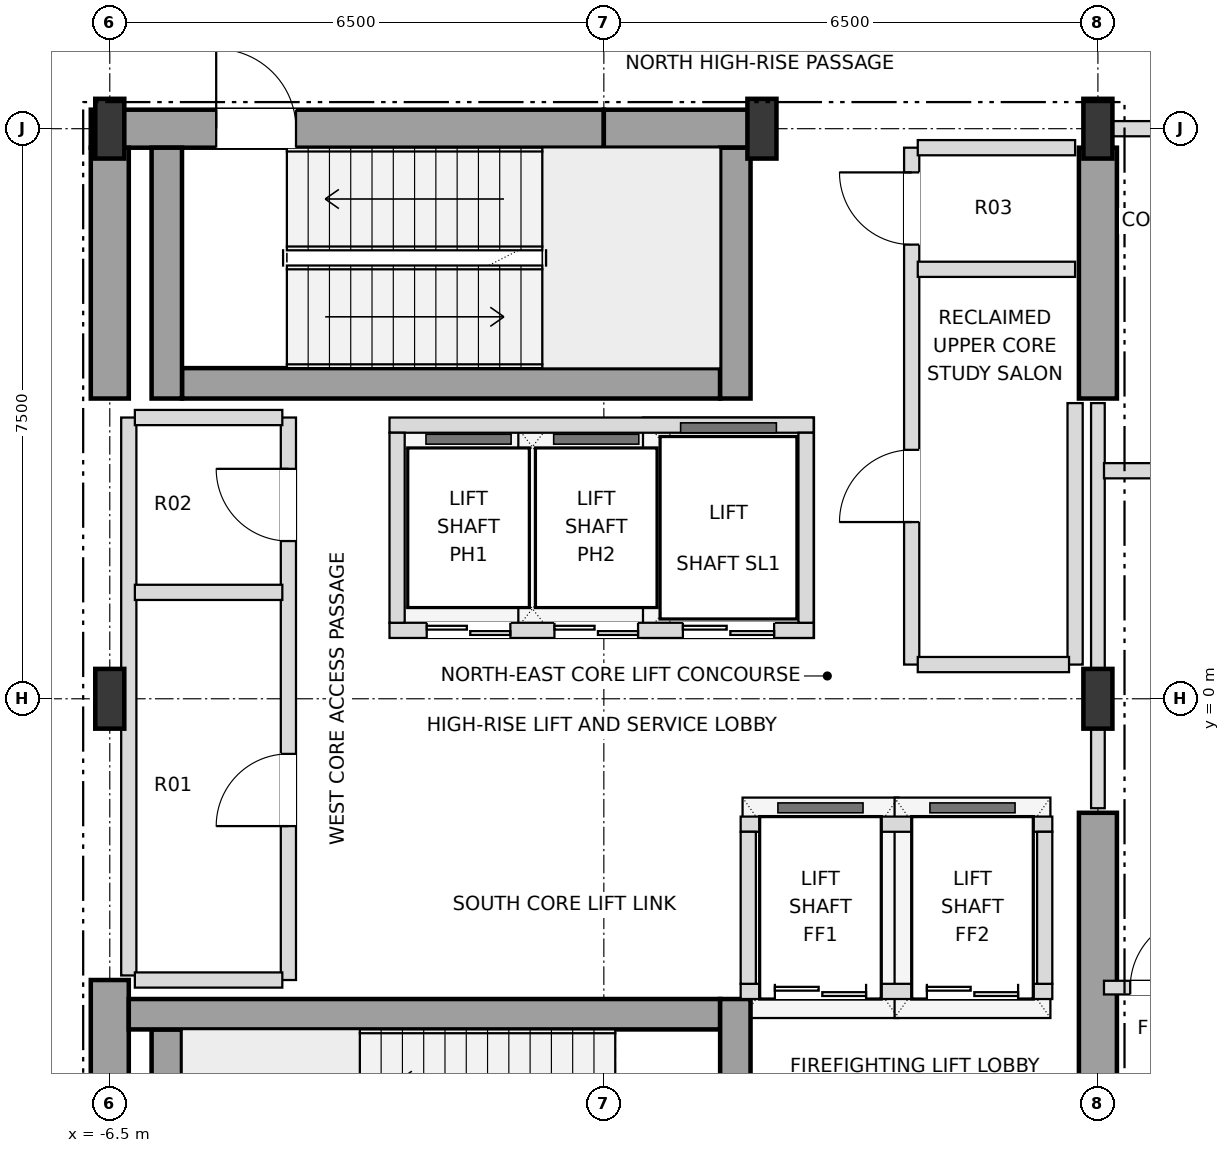
"""IFC4 building model, lengths in metres.
Left out: names, types, materials, properties, quantities, classifications, styles, units other than length and angle.
Written with IfcOpenShell. Run it as: python <this file> out.ifc"""

import sys

from ifc_helpers import new_model, si_unit, direction, frame, frame_2d, origin, origin_2d, place, context, subcontext, project, spatial, rectangle, i_section, extrude, element, fill, save


model = new_model("IFC4")
c1 = context("Model", 3, precision=1e-05, world=origin(), true_north=direction((0.0, 1.0)))
c2 = subcontext(c1, "Body", "Model", "MODEL_VIEW")
j1 = project(units=[si_unit("LENGTHUNIT", "METRE"), si_unit("PLANEANGLEUNIT", "RADIAN")], contexts=[c1])
p1 = place(None, origin())
s1 = spatial("IfcSite", under=j1, at=p1, CompositionType="ELEMENT")
p2 = place(p1, origin())
s2 = spatial("IfcBuilding", under=s1, at=p2, CompositionType="ELEMENT")
p3 = place(p2, frame((0.0, 0.0, 217.8)))
s3 = spatial("IfcBuildingStorey", under=s2, at=p3, CompositionType="ELEMENT", Elevation=217.8)
for number, where, z_axis, x_axis in (
    (1, (-6.5, 0.0, 0.0), (0.0, 0.0, 1.0), (1.0, 0.0, 0.0)),
    (2, (6.5, 0.0, 0.0), (0.0, 0.0, 1.0), (1.0, 0.0, 0.0)),
    (3, (-6.5, 7.5, 0.0), (0.0, 0.0, 1.0), (1.0, 0.0, 0.0)),
    (4, (2.08, 7.5, 0.0), (0.0, 0.0, 1.0), (1.0, 0.0, 0.0)),
    (5, (6.5, 7.5, 0.0), (0.0, 0.0, 1.0), (1.0, 0.0, 0.0)),
):
    element("IfcColumn", number, at=place(p3, frame(where, z_axis=z_axis, x_axis=x_axis)), inside=s3, PredefinedType="COLUMN", context=c2, shape_type="SweptSolid", body=[
        extrude(i_section(OverallWidth=0.382, OverallDepth=0.786, WebThickness=0.02, FlangeThickness=0.033, at=origin_2d()), origin(), (0.0, 0.0, 1.0), 4.5),
    ])
p4 = place(p3, frame((-6.75, 7.5, 0.0), z_axis=(0.0, 0.0, 1.0), x_axis=(1.0, 0.0, 0.0)))
e6 = element("IfcWall", 6, at=p4, inside=s3, PredefinedType="SHEAR", context=c2, shape_type="SweptSolid", body=[
    extrude(rectangle(XDim=6.75, YDim=0.5, at=frame_2d((3.375, 0.0))), origin(), (0.0, 0.0, 1.0), 4.28),
])
p5 = place(p4, frame((1.65, 0.0, 0.0)))
e7 = element("IfcOpeningElement", 7, at=p5, cuts=e6, PredefinedType="OPENING", context=c2, shape_type="SweptSolid", body=[
    extrude(rectangle(XDim=1.05, YDim=2.15, at=frame_2d((0.525, 1.075))), frame((0.0, 0.26, 0.0), z_axis=(0.0, -1.0, 0.0), x_axis=(1.0, 0.0, 0.0)), (0.0, 0.0, 1.0), 0.52),
])
p6 = place(p3, frame((0.0, 7.5, 0.0), z_axis=(0.0, 0.0, 1.0), x_axis=(1.0, 0.0, 0.0)))
e8 = element("IfcWall", 8, at=p6, inside=s3, PredefinedType="SHEAR", context=c2, shape_type="SweptSolid", body=[
    extrude(rectangle(XDim=2.08, YDim=0.5, at=frame_2d((1.04, 0.0))), origin(), (0.0, 0.0, 1.0), 4.28),
])
p7 = place(p3, frame((-6.5, -7.25, 0.0), z_axis=(0.0, 0.0, 1.0), x_axis=(0.0, 1.0, 0.0)))
e9 = element("IfcWall", 9, at=p7, inside=s3, PredefinedType="SHEAR", context=c2, shape_type="SweptSolid", body=[
    extrude(rectangle(XDim=3.55, YDim=0.5, at=frame_2d((1.775, 0.0))), origin(), (0.0, 0.0, 1.0), 4.28),
])
p8 = place(p3, frame((-6.5, 3.95, 0.0), z_axis=(0.0, 0.0, 1.0), x_axis=(0.0, 1.0, 0.0)))
e10 = element("IfcWall", 10, at=p8, inside=s3, PredefinedType="SHEAR", context=c2, shape_type="SweptSolid", body=[
    extrude(rectangle(XDim=3.3, YDim=0.5, at=frame_2d((1.65, 0.0))), origin(), (0.0, 0.0, 1.0), 4.28),
])
p9 = place(p3, frame((6.5, -7.25, 0.0), z_axis=(0.0, 0.0, 1.0), x_axis=(0.0, 1.0, 0.0)))
e11 = element("IfcWall", 11, at=p9, inside=s3, PredefinedType="SHEAR", context=c2, shape_type="SweptSolid", body=[
    extrude(rectangle(XDim=5.75, YDim=0.5, at=frame_2d((2.875, 0.0))), origin(), (0.0, 0.0, 1.0), 4.28),
])
p10 = place(p9, frame((0.85, 0.0, 0.0)))
e12 = element("IfcOpeningElement", 12, at=p10, cuts=e11, PredefinedType="OPENING", context=c2, shape_type="SweptSolid", body=[
    extrude(rectangle(XDim=1.05, YDim=2.15, at=frame_2d((0.525, 1.075))), frame((0.0, 0.26, 0.0), z_axis=(0.0, -1.0, 0.0), x_axis=(1.0, 0.0, 0.0)), (0.0, 0.0, 1.0), 0.52),
])
p11 = place(p3, frame((6.5, 3.95, 0.0), z_axis=(0.0, 0.0, 1.0), x_axis=(0.0, 1.0, 0.0)))
e13 = element("IfcWall", 13, at=p11, inside=s3, PredefinedType="SHEAR", context=c2, shape_type="SweptSolid", body=[
    extrude(rectangle(XDim=3.3, YDim=0.5, at=frame_2d((1.65, 0.0))), origin(), (0.0, 0.0, 1.0), 4.28),
])
p12 = place(p3, frame((-5.75, -7.25, 0.0), z_axis=(0.0, 0.0, 1.0), x_axis=(0.0, 1.0, 0.0)))
e14 = element("IfcWall", 14, at=p12, inside=s3, PredefinedType="SHEAR", context=c2, shape_type="SweptSolid", body=[
    extrude(rectangle(XDim=2.9, YDim=0.4, at=frame_2d((1.45, 0.0))), origin(), (0.0, 0.0, 1.0), 4.28),
])
p13 = place(p3, frame((-6.25, -4.15, 0.0), z_axis=(0.0, 0.0, 1.0), x_axis=(1.0, 0.0, 0.0)))
e15 = element("IfcWall", 15, at=p13, inside=s3, PredefinedType="SHEAR", context=c2, shape_type="SweptSolid", body=[
    extrude(rectangle(XDim=7.78, YDim=0.4, at=frame_2d((3.89, 0.0))), origin(), (0.0, 0.0, 1.0), 4.28),
])
p14 = place(p3, frame((1.73, -7.25, 0.0), z_axis=(0.0, 0.0, 1.0), x_axis=(0.0, 1.0, 0.0)))
e16 = element("IfcWall", 16, at=p14, inside=s3, PredefinedType="SHEAR", context=c2, shape_type="SweptSolid", body=[
    extrude(rectangle(XDim=3.3, YDim=0.4, at=frame_2d((1.65, 0.0))), origin(), (0.0, 0.0, 1.0), 4.28),
])
p15 = place(p14, frame((0.9, 0.0, 0.0)))
e17 = element("IfcOpeningElement", 17, at=p15, cuts=e16, PredefinedType="OPENING", context=c2, shape_type="SweptSolid", body=[
    extrude(rectangle(XDim=1.05, YDim=2.15, at=frame_2d((0.525, 1.075))), frame((0.0, 0.21, 0.0), z_axis=(0.0, -1.0, 0.0), x_axis=(1.0, 0.0, 0.0)), (0.0, 0.0, 1.0), 0.42),
])
p16 = place(p3, frame((-5.55, 4.15, 0.0), z_axis=(0.0, 0.0, 1.0), x_axis=(1.0, 0.0, 0.0)))
e18 = element("IfcWall", 18, at=p16, inside=s3, PredefinedType="SHEAR", context=c2, shape_type="SweptSolid", body=[
    extrude(rectangle(XDim=7.08, YDim=0.4, at=frame_2d((3.54, 0.0))), origin(), (0.0, 0.0, 1.0), 4.28),
])
for number, where, z_axis, x_axis in (
    (19, (1.73, 3.95, 0.0), (0.0, 0.0, 1.0), (0.0, 1.0, 0.0)),
    (20, (-5.75, 3.95, 0.0), (0.0, 0.0, 1.0), (0.0, 1.0, 0.0)),
):
    element("IfcWall", number, at=place(p3, frame(where, z_axis=z_axis, x_axis=x_axis)), inside=s3, PredefinedType="SHEAR", context=c2, shape_type="SweptSolid", body=[
        extrude(rectangle(XDim=3.3, YDim=0.4, at=frame_2d((1.65, 0.0))), origin(), (0.0, 0.0, 1.0), 4.28),
    ])
p17 = place(p3, frame((-2.82, 0.9, 0.0), z_axis=(0.0, 0.0, 1.0), x_axis=(1.0, 0.0, 0.0)))
e21 = element("IfcWall", 21, at=p17, inside=s3, PredefinedType="SOLIDWALL", context=c2, shape_type="SweptSolid", body=[
    extrude(rectangle(XDim=5.58, YDim=0.2, at=frame_2d((2.79, 0.0))), origin(), (0.0, 0.0, 1.0), 4.28),
])
p18 = place(p17, frame((0.49, 0.0, 0.0)))
e22 = element("IfcOpeningElement", 22, at=p18, cuts=e21, PredefinedType="OPENING", context=c2, shape_type="SweptSolid", body=[
    extrude(rectangle(XDim=1.1, YDim=2.15, at=frame_2d((0.55, 1.075))), frame((0.0, 0.11, 0.0), z_axis=(0.0, -1.0, 0.0), x_axis=(1.0, 0.0, 0.0)), (0.0, 0.0, 1.0), 0.22),
])
p19 = place(p17, frame((2.17, 0.0, 0.0)))
e23 = element("IfcOpeningElement", 23, at=p19, cuts=e21, PredefinedType="OPENING", context=c2, shape_type="SweptSolid", body=[
    extrude(rectangle(XDim=1.1, YDim=2.15, at=frame_2d((0.55, 1.075))), frame((0.0, 0.11, 0.0), z_axis=(0.0, -1.0, 0.0), x_axis=(1.0, 0.0, 0.0)), (0.0, 0.0, 1.0), 0.22),
])
p20 = place(p17, frame((3.86, 0.0, 0.0)))
e24 = element("IfcOpeningElement", 24, at=p20, cuts=e21, PredefinedType="OPENING", context=c2, shape_type="SweptSolid", body=[
    extrude(rectangle(XDim=1.2, YDim=2.2, at=frame_2d((0.6, 1.1))), frame((0.0, 0.11, 0.0), z_axis=(0.0, -1.0, 0.0), x_axis=(1.0, 0.0, 0.0)), (0.0, 0.0, 1.0), 0.22),
])
p21 = place(p3, frame((-2.82, 3.6, 0.0), z_axis=(0.0, 0.0, 1.0), x_axis=(1.0, 0.0, 0.0)))
e25 = element("IfcWall", 25, at=p21, inside=s3, PredefinedType="SOLIDWALL", context=c2, shape_type="SweptSolid", body=[
    extrude(rectangle(XDim=5.58, YDim=0.2, at=frame_2d((2.79, 0.0))), origin(), (0.0, 0.0, 1.0), 4.28),
])
for number, where, z_axis, x_axis in (
    (26, (-2.72, 1.0, 0.0), (0.0, 0.0, 1.0), (0.0, 1.0, 0.0)),
    (27, (2.66, 1.0, 0.0), (0.0, 0.0, 1.0), (0.0, 1.0, 0.0)),
):
    element("IfcWall", number, at=place(p3, frame(where, z_axis=z_axis, x_axis=x_axis)), inside=s3, PredefinedType="SOLIDWALL", context=c2, shape_type="SweptSolid", body=[
        extrude(rectangle(XDim=2.5, YDim=0.2, at=frame_2d((1.25, 0.0))), origin(), (0.0, 0.0, 1.0), 4.28),
    ])
p22 = place(p3, frame((1.8, -3.85, 0.0), z_axis=(0.0, 0.0, 1.0), x_axis=(1.0, 0.0, 0.0)))
e28 = element("IfcWall", 28, at=p22, inside=s3, PredefinedType="SOLIDWALL", context=c2, shape_type="SweptSolid", body=[
    extrude(rectangle(XDim=4.1, YDim=0.2, at=frame_2d((2.05, 0.0))), origin(), (0.0, 0.0, 1.0), 4.28),
])
p23 = place(p22, frame((0.45, 0.0, 0.0)))
e29 = element("IfcOpeningElement", 29, at=p23, cuts=e28, PredefinedType="OPENING", context=c2, shape_type="SweptSolid", body=[
    extrude(rectangle(XDim=1.2, YDim=2.2, at=frame_2d((0.6, 1.1))), frame((0.0, 0.11, 0.0), z_axis=(0.0, -1.0, 0.0), x_axis=(1.0, 0.0, 0.0)), (0.0, 0.0, 1.0), 0.22),
])
p24 = place(p22, frame((2.45, 0.0, 0.0)))
e30 = element("IfcOpeningElement", 30, at=p24, cuts=e28, PredefinedType="OPENING", context=c2, shape_type="SweptSolid", body=[
    extrude(rectangle(XDim=1.2, YDim=2.2, at=frame_2d((0.6, 1.1))), frame((0.0, 0.11, 0.0), z_axis=(0.0, -1.0, 0.0), x_axis=(1.0, 0.0, 0.0)), (0.0, 0.0, 1.0), 0.22),
])
p25 = place(p3, frame((1.8, -1.65, 0.0), z_axis=(0.0, 0.0, 1.0), x_axis=(1.0, 0.0, 0.0)))
e31 = element("IfcWall", 31, at=p25, inside=s3, PredefinedType="SOLIDWALL", context=c2, shape_type="SweptSolid", body=[
    extrude(rectangle(XDim=4.1, YDim=0.2, at=frame_2d((2.05, 0.0))), origin(), (0.0, 0.0, 1.0), 4.28),
])
for number, where, z_axis, x_axis in (
    (32, (1.9, -3.75, 0.0), (0.0, 0.0, 1.0), (0.0, 1.0, 0.0)),
    (33, (5.8, -3.75, 0.0), (0.0, 0.0, 1.0), (0.0, 1.0, 0.0)),
):
    element("IfcWall", number, at=place(p3, frame(where, z_axis=z_axis, x_axis=x_axis)), inside=s3, PredefinedType="SOLIDWALL", context=c2, shape_type="SweptSolid", body=[
        extrude(rectangle(XDim=2.0, YDim=0.2, at=frame_2d((1.0, 0.0))), origin(), (0.0, 0.0, 1.0), 4.28),
    ])
p26 = place(p3, frame((-6.25, -3.64, 0.0), z_axis=(0.0, 0.0, 1.0), x_axis=(0.0, 1.0, 0.0)))
e34 = element("IfcWall", 34, at=p26, inside=s3, PredefinedType="SOLIDWALL", context=c2, shape_type="SweptSolid", body=[
    extrude(rectangle(XDim=7.34, YDim=0.2, at=frame_2d((3.67, 0.0))), origin(), (0.0, 0.0, 1.0), 4.28),
])
p27 = place(p3, frame((-4.15, -3.7, 0.0), z_axis=(0.0, 0.0, 1.0), x_axis=(0.0, 1.0, 0.0)))
e35 = element("IfcWall", 35, at=p27, inside=s3, PredefinedType="SOLIDWALL", context=c2, shape_type="SweptSolid", body=[
    extrude(rectangle(XDim=7.4, YDim=0.2, at=frame_2d((3.7, 0.0))), origin(), (0.0, 0.0, 1.0), 4.28),
])
p28 = place(p27, frame((2.025, 0.0, 0.0)))
e36 = element("IfcOpeningElement", 36, at=p28, cuts=e35, PredefinedType="OPENING", context=c2, shape_type="SweptSolid", body=[
    extrude(rectangle(XDim=0.95, YDim=2.15, at=frame_2d((0.475, 1.075))), frame((0.0, 0.11, 0.0), z_axis=(0.0, -1.0, 0.0), x_axis=(1.0, 0.0, 0.0)), (0.0, 0.0, 1.0), 0.22),
])
p29 = place(p27, frame((5.775, 0.0, 0.0)))
e37 = element("IfcOpeningElement", 37, at=p29, cuts=e35, PredefinedType="OPENING", context=c2, shape_type="SweptSolid", body=[
    extrude(rectangle(XDim=0.95, YDim=2.15, at=frame_2d((0.475, 1.075))), frame((0.0, 0.11, 0.0), z_axis=(0.0, -1.0, 0.0), x_axis=(1.0, 0.0, 0.0)), (0.0, 0.0, 1.0), 0.22),
])
p30 = place(p3, frame((4.05, 0.45, 0.0), z_axis=(0.0, 0.0, 1.0), x_axis=(0.0, 1.0, 0.0)))
e38 = element("IfcWall", 38, at=p30, inside=s3, PredefinedType="SOLIDWALL", context=c2, shape_type="SweptSolid", body=[
    extrude(rectangle(XDim=6.8, YDim=0.2, at=frame_2d((3.4, 0.0))), origin(), (0.0, 0.0, 1.0), 4.28),
])
p31 = place(p30, frame((1.875, 0.0, 0.0)))
e39 = element("IfcOpeningElement", 39, at=p31, cuts=e38, PredefinedType="OPENING", context=c2, shape_type="SweptSolid", body=[
    extrude(rectangle(XDim=0.95, YDim=2.15, at=frame_2d((0.475, 1.075))), frame((0.0, 0.11, 0.0), z_axis=(0.0, -1.0, 0.0), x_axis=(1.0, 0.0, 0.0)), (0.0, 0.0, 1.0), 0.22),
])
p32 = place(p30, frame((5.525, 0.0, 0.0)))
e40 = element("IfcOpeningElement", 40, at=p32, cuts=e38, PredefinedType="OPENING", context=c2, shape_type="SweptSolid", body=[
    extrude(rectangle(XDim=0.95, YDim=2.15, at=frame_2d((0.475, 1.075))), frame((0.0, 0.11, 0.0), z_axis=(0.0, -1.0, 0.0), x_axis=(1.0, 0.0, 0.0)), (0.0, 0.0, 1.0), 0.22),
])
p33 = place(p3, frame((6.2, 0.45, 0.0), z_axis=(0.0, 0.0, 1.0), x_axis=(0.0, 1.0, 0.0)))
e41 = element("IfcWall", 41, at=p33, inside=s3, PredefinedType="SOLIDWALL", context=c2, shape_type="SweptSolid", body=[
    extrude(rectangle(XDim=3.44, YDim=0.2, at=frame_2d((1.72, 0.0))), origin(), (0.0, 0.0, 1.0), 4.28),
])
p34 = place(p3, frame((6.5, -1.44, 0.0), z_axis=(0.0, 0.0, 1.0), x_axis=(0.0, 1.0, 0.0)))
e42 = element("IfcWall", 42, at=p34, inside=s3, PredefinedType="PARTITIONING", context=c2, shape_type="SweptSolid", body=[
    extrude(rectangle(XDim=5.33, YDim=0.18, at=frame_2d((2.665, 0.0))), origin(), (0.0, 0.0, 1.0), 3.726),
])
p35 = place(p3, frame((6.58, -3.8, 0.0), z_axis=(0.0, 0.0, 1.0), x_axis=(1.0, 0.0, 0.0)))
e43 = element("IfcWall", 43, at=p35, inside=s3, PredefinedType="PARTITIONING", context=c2, shape_type="SweptSolid", body=[
    extrude(rectangle(XDim=1.64, YDim=0.18, at=frame_2d((0.82, 0.0))), origin(), (0.0, 0.0, 1.0), 4.28),
])
p36 = place(p35, frame((0.345, 0.0, 0.0)))
e44 = element("IfcOpeningElement", 44, at=p36, cuts=e43, PredefinedType="OPENING", context=c2, shape_type="SweptSolid", body=[
    extrude(rectangle(XDim=0.95, YDim=2.15, at=frame_2d((0.475, 1.075))), frame((0.0, 0.1, 0.0), z_axis=(0.0, -1.0, 0.0), x_axis=(1.0, 0.0, 0.0)), (0.0, 0.0, 1.0), 0.2),
])
p37 = place(p3, frame((-6.17, -3.7, 0.0), z_axis=(0.0, 0.0, 1.0), x_axis=(1.0, 0.0, 0.0)))
e45 = element("IfcWall", 45, at=p37, inside=s3, PredefinedType="SOLIDWALL", context=c2, shape_type="SweptSolid", body=[
    extrude(rectangle(XDim=1.94, YDim=0.2, at=frame_2d((0.97, 0.0))), origin(), (0.0, 0.0, 1.0), 4.28),
])
p38 = place(p3, frame((4.13, 0.45, 0.0), z_axis=(0.0, 0.0, 1.0), x_axis=(1.0, 0.0, 0.0)))
e46 = element("IfcWall", 46, at=p38, inside=s3, PredefinedType="SOLIDWALL", context=c2, shape_type="SweptSolid", body=[
    extrude(rectangle(XDim=1.99, YDim=0.2, at=frame_2d((0.995, 0.0))), origin(), (0.0, 0.0, 1.0), 4.28),
])
p39 = place(p3, frame((-6.17, 1.4, 0.0), z_axis=(0.0, 0.0, 1.0), x_axis=(1.0, 0.0, 0.0)))
e47 = element("IfcWall", 47, at=p39, inside=s3, PredefinedType="SOLIDWALL", context=c2, shape_type="SweptSolid", body=[
    extrude(rectangle(XDim=1.94, YDim=0.2, at=frame_2d((0.97, 0.0))), origin(), (0.0, 0.0, 1.0), 4.28),
])
p40 = place(p3, frame((6.58, 3.0, 0.0), z_axis=(0.0, 0.0, 1.0), x_axis=(1.0, 0.0, 0.0)))
e48 = element("IfcWall", 48, at=p40, inside=s3, PredefinedType="SOLIDWALL", context=c2, shape_type="SweptSolid", body=[
    extrude(rectangle(XDim=4.74, YDim=0.2, at=frame_2d((2.37, 0.0))), origin(), (0.0, 0.0, 1.0), 4.28),
])
p41 = place(p40, frame((1.845, 0.0, 0.0)))
e49 = element("IfcOpeningElement", 49, at=p41, cuts=e48, PredefinedType="OPENING", context=c2, shape_type="SweptSolid", body=[
    extrude(rectangle(XDim=0.95, YDim=2.15, at=frame_2d((0.475, 1.075))), frame((0.0, 0.11, 0.0), z_axis=(0.0, -1.0, 0.0), x_axis=(1.0, 0.0, 0.0)), (0.0, 0.0, 1.0), 0.22),
])
p42 = place(p3, frame((-6.17, 3.7, 0.0), z_axis=(0.0, 0.0, 1.0), x_axis=(1.0, 0.0, 0.0)))
e50 = element("IfcWall", 50, at=p42, inside=s3, PredefinedType="SOLIDWALL", context=c2, shape_type="SweptSolid", body=[
    extrude(rectangle(XDim=1.94, YDim=0.2, at=frame_2d((0.97, 0.0))), origin(), (0.0, 0.0, 1.0), 4.28),
])
for number, where, z_axis, x_axis in (
    (51, (4.13, 5.65, 0.0), (0.0, 0.0, 1.0), (1.0, 0.0, 0.0)),
    (52, (4.13, 7.25, 0.0), (0.0, 0.0, 1.0), (1.0, 0.0, 0.0)),
):
    element("IfcWall", number, at=place(p3, frame(where, z_axis=z_axis, x_axis=x_axis)), inside=s3, PredefinedType="SOLIDWALL", context=c2, shape_type="SweptSolid", body=[
        extrude(rectangle(XDim=2.07, YDim=0.2, at=frame_2d((1.035, 0.0))), origin(), (0.0, 0.0, 1.0), 4.28),
    ])
p43 = place(p3, frame((6.5, 7.5, 0.0), z_axis=(0.0, 0.0, 1.0), x_axis=(1.0, 0.0, 0.0)))
e53 = element("IfcWall", 53, at=p43, inside=s3, PredefinedType="SOLIDWALL", context=c2, shape_type="SweptSolid", body=[
    extrude(rectangle(XDim=4.82, YDim=0.2, at=frame_2d((2.41, 0.0))), origin(), (0.0, 0.0, 1.0), 3.726),
])
p44 = place(p5, origin())
e54 = element("IfcDoor", 54, at=p44, inside=s3, OperationType="SINGLE_SWING_LEFT", PredefinedType="DOOR", context=c2, shape_type="SweptSolid", body=[
    extrude(rectangle(XDim=1.05, YDim=2.15, at=frame_2d((0.525, 1.075))), frame((0.0, 0.025, 0.0), z_axis=(0.0, -1.0, 0.0), x_axis=(1.0, 0.0, 0.0)), (0.0, 0.0, 1.0), 0.05),
])
fill(e7, e54)
p45 = place(p18, origin())
e55 = element("IfcDoor", 55, at=p45, inside=s3, OperationType="DOUBLE_DOOR_SLIDING", PredefinedType="DOOR", context=c2, shape_type="SweptSolid", body=[
    extrude(rectangle(XDim=1.1, YDim=2.15, at=frame_2d((0.55, 1.075))), frame((0.0, 0.025, 0.0), z_axis=(0.0, -1.0, 0.0), x_axis=(1.0, 0.0, 0.0)), (0.0, 0.0, 1.0), 0.05),
])
fill(e22, e55)
p46 = place(p19, origin())
e56 = element("IfcDoor", 56, at=p46, inside=s3, OperationType="DOUBLE_DOOR_SLIDING", PredefinedType="DOOR", context=c2, shape_type="SweptSolid", body=[
    extrude(rectangle(XDim=1.1, YDim=2.15, at=frame_2d((0.55, 1.075))), frame((0.0, 0.025, 0.0), z_axis=(0.0, -1.0, 0.0), x_axis=(1.0, 0.0, 0.0)), (0.0, 0.0, 1.0), 0.05),
])
fill(e23, e56)
p47 = place(p20, origin())
e57 = element("IfcDoor", 57, at=p47, inside=s3, OperationType="DOUBLE_DOOR_SLIDING", PredefinedType="DOOR", context=c2, shape_type="SweptSolid", body=[
    extrude(rectangle(XDim=1.2, YDim=2.2, at=frame_2d((0.6, 1.1))), frame((0.0, 0.025, 0.0), z_axis=(0.0, -1.0, 0.0), x_axis=(1.0, 0.0, 0.0)), (0.0, 0.0, 1.0), 0.05),
])
fill(e24, e57)
p48 = place(p23, origin())
e58 = element("IfcDoor", 58, at=p48, inside=s3, OperationType="DOUBLE_DOOR_SLIDING", PredefinedType="DOOR", context=c2, shape_type="SweptSolid", body=[
    extrude(rectangle(XDim=1.2, YDim=2.2, at=frame_2d((0.6, 1.1))), frame((0.0, 0.025, 0.0), z_axis=(0.0, -1.0, 0.0), x_axis=(1.0, 0.0, 0.0)), (0.0, 0.0, 1.0), 0.05),
])
fill(e29, e58)
p49 = place(p24, origin())
e59 = element("IfcDoor", 59, at=p49, inside=s3, OperationType="DOUBLE_DOOR_SLIDING", PredefinedType="DOOR", context=c2, shape_type="SweptSolid", body=[
    extrude(rectangle(XDim=1.2, YDim=2.2, at=frame_2d((0.6, 1.1))), frame((0.0, 0.025, 0.0), z_axis=(0.0, -1.0, 0.0), x_axis=(1.0, 0.0, 0.0)), (0.0, 0.0, 1.0), 0.05),
])
fill(e30, e59)
p50 = place(p28, origin())
e60 = element("IfcDoor", 60, at=p50, inside=s3, OperationType="SINGLE_SWING_LEFT", PredefinedType="DOOR", context=c2, shape_type="SweptSolid", body=[
    extrude(rectangle(XDim=0.95, YDim=2.15, at=frame_2d((0.475, 1.075))), frame((0.0, 0.025, 0.0), z_axis=(0.0, -1.0, 0.0), x_axis=(1.0, 0.0, 0.0)), (0.0, 0.0, 1.0), 0.05),
])
fill(e36, e60)
p51 = place(p29, origin())
e61 = element("IfcDoor", 61, at=p51, inside=s3, OperationType="SINGLE_SWING_RIGHT", PredefinedType="DOOR", context=c2, shape_type="SweptSolid", body=[
    extrude(rectangle(XDim=0.95, YDim=2.15, at=frame_2d((0.475, 1.075))), frame((0.0, 0.025, 0.0), z_axis=(0.0, -1.0, 0.0), x_axis=(1.0, 0.0, 0.0)), (0.0, 0.0, 1.0), 0.05),
])
fill(e37, e61)
p52 = place(p31, origin())
e62 = element("IfcDoor", 62, at=p52, inside=s3, OperationType="SINGLE_SWING_LEFT", PredefinedType="DOOR", context=c2, shape_type="SweptSolid", body=[
    extrude(rectangle(XDim=0.95, YDim=2.15, at=frame_2d((0.475, 1.075))), frame((0.0, 0.025, 0.0), z_axis=(0.0, -1.0, 0.0), x_axis=(1.0, 0.0, 0.0)), (0.0, 0.0, 1.0), 0.05),
])
fill(e39, e62)
p53 = place(p32, origin())
e63 = element("IfcDoor", 63, at=p53, inside=s3, OperationType="SINGLE_SWING_RIGHT", PredefinedType="DOOR", context=c2, shape_type="SweptSolid", body=[
    extrude(rectangle(XDim=0.95, YDim=2.15, at=frame_2d((0.475, 1.075))), frame((0.0, 0.025, 0.0), z_axis=(0.0, -1.0, 0.0), x_axis=(1.0, 0.0, 0.0)), (0.0, 0.0, 1.0), 0.05),
])
fill(e40, e63)
p54 = place(p36, origin())
e64 = element("IfcDoor", 64, at=p54, inside=s3, OperationType="SINGLE_SWING_RIGHT", PredefinedType="DOOR", context=c2, shape_type="SweptSolid", body=[
    extrude(rectangle(XDim=0.95, YDim=2.15, at=frame_2d((0.475, 1.075))), frame((0.0, 0.025, 0.0), z_axis=(0.0, -1.0, 0.0), x_axis=(1.0, 0.0, 0.0)), (0.0, 0.0, 1.0), 0.05),
])
fill(e44, e64)
save(model, sys.argv[1])
